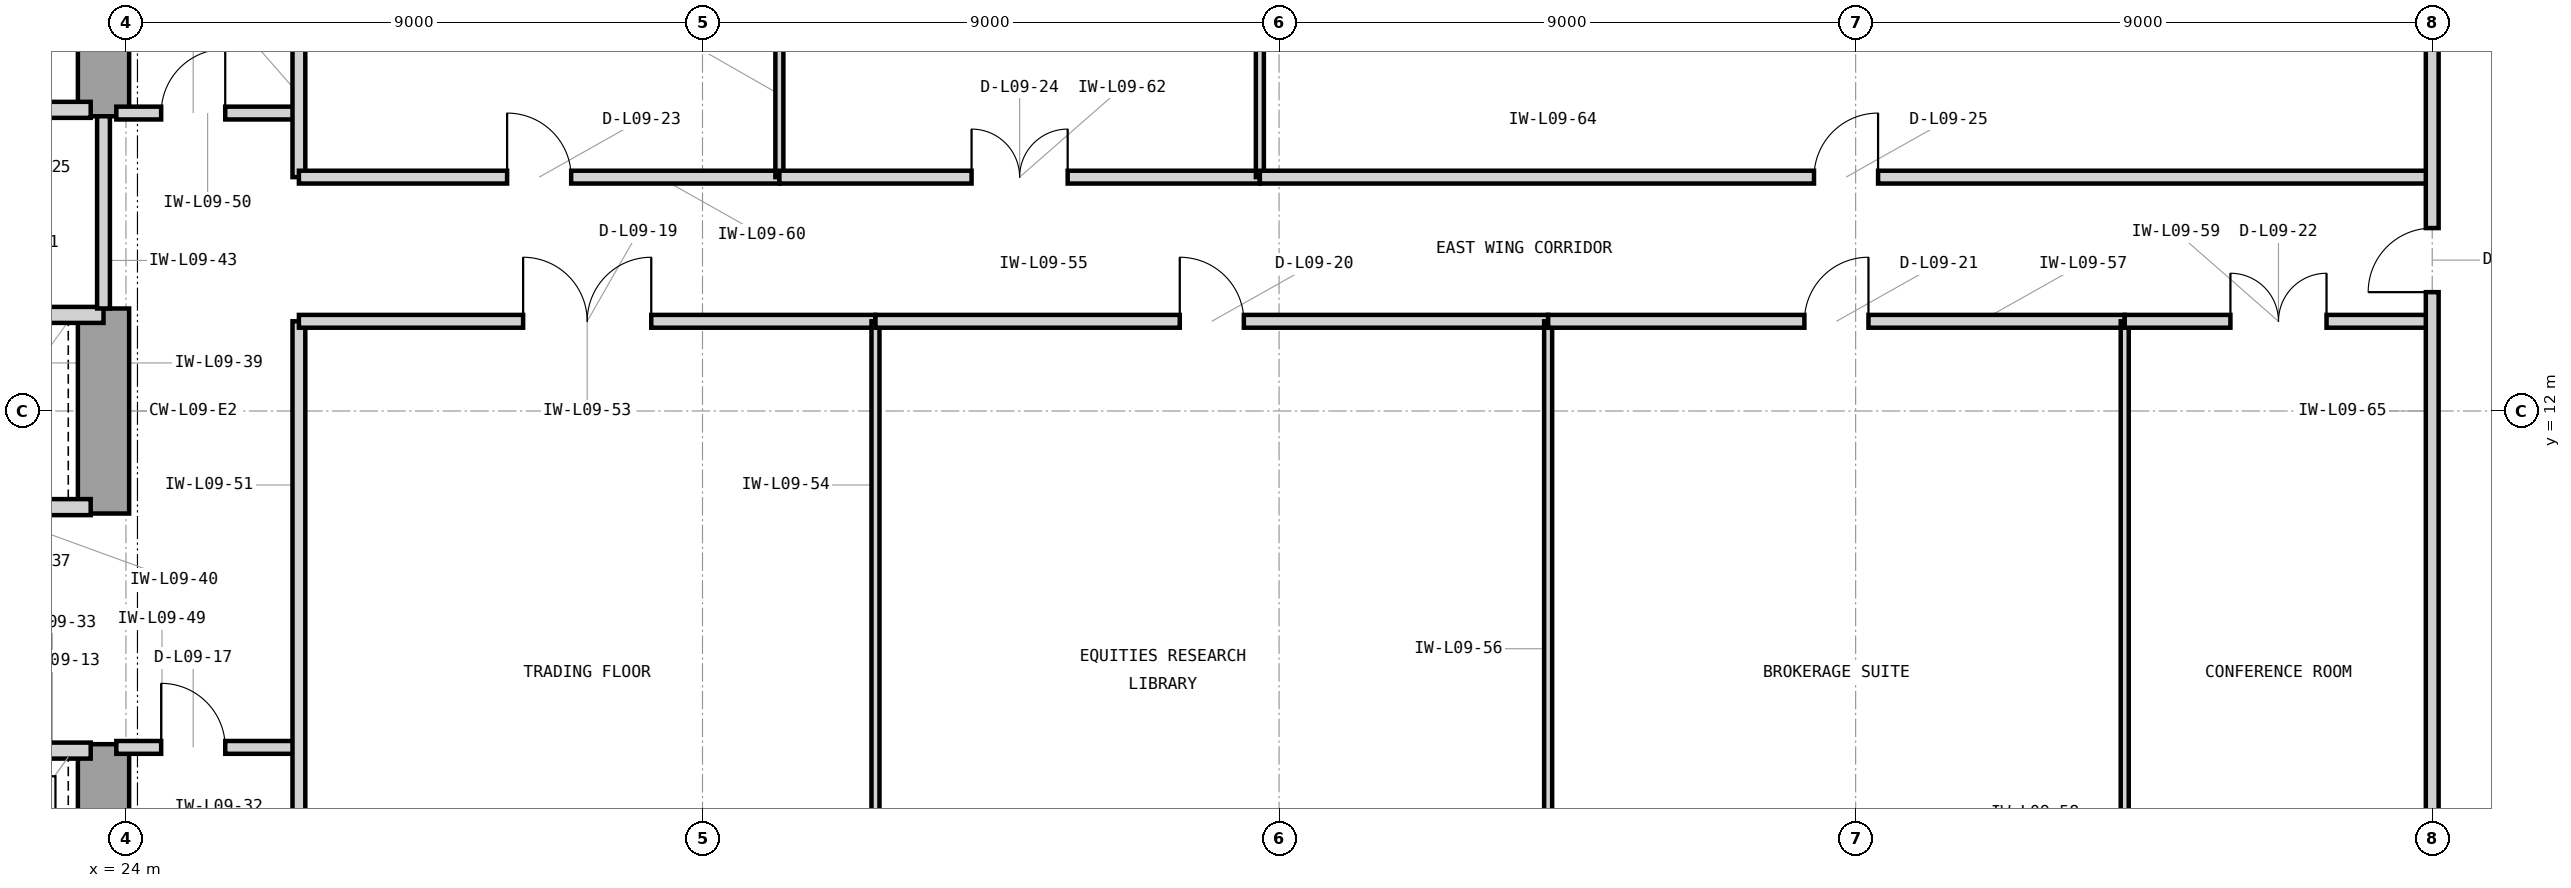
"""IFC4 building model, lengths in metres.
Left out: names, types, materials, properties, quantities, classifications, styles, units other than length and angle.
Written with IfcOpenShell. Run it as: python <this file> out.ifc"""

import sys

from ifc_helpers import new_model, si_unit, direction, frame, frame_2d, origin, place, context, subcontext, project, spatial, rectangle, extrude, element, fill, save


model = new_model("IFC4")
c1 = context("Model", 3, precision=1e-05, world=origin(), true_north=direction((0.0, 1.0)))
c2 = subcontext(c1, "Body", "Model", "MODEL_VIEW")
j1 = project(units=[si_unit("LENGTHUNIT", "METRE"), si_unit("PLANEANGLEUNIT", "RADIAN")], contexts=[c1])
p1 = place(None, origin())
s1 = spatial("IfcSite", under=j1, at=p1, CompositionType="ELEMENT")
p2 = place(p1, origin())
s2 = spatial("IfcBuilding", under=s1, at=p2, CompositionType="ELEMENT")
p3 = place(p2, frame((0.0, 0.0, 42.6)))
s3 = spatial("IfcBuildingStorey", under=s2, at=p3, CompositionType="ELEMENT", Elevation=42.6)
p4 = place(p3, frame((23.65, 3.75, 0.0), z_axis=(0.0, 0.0, 1.0), x_axis=(0.0, 1.0, 0.0)))
e1 = element("IfcWall", 1, at=p4, inside=s3, PredefinedType="SHEAR", context=c2, shape_type="SweptSolid", body=[
    extrude(rectangle(XDim=3.05, YDim=0.8, at=frame_2d((1.525, 0.0))), origin(), (0.0, 0.0, 1.0), 4.2),
])
p5 = place(p3, frame((23.65, 10.4, 0.0), z_axis=(0.0, 0.0, 1.0), x_axis=(0.0, 1.0, 0.0)))
e2 = element("IfcWall", 2, at=p5, inside=s3, PredefinedType="SHEAR", context=c2, shape_type="SweptSolid", body=[
    extrude(rectangle(XDim=3.2, YDim=0.8, at=frame_2d((1.6, 0.0))), origin(), (0.0, 0.0, 1.0), 4.2),
])
p6 = place(p3, frame((23.65, 16.6, 0.0), z_axis=(0.0, 0.0, 1.0), x_axis=(0.0, 1.0, 0.0)))
e3 = element("IfcWall", 3, at=p6, inside=s3, PredefinedType="SHEAR", context=c2, shape_type="SweptSolid", body=[
    extrude(rectangle(XDim=4.05, YDim=0.8, at=frame_2d((2.025, 0.0))), origin(), (0.0, 0.0, 1.0), 4.2),
])
p7 = place(p3, frame((21.05, 16.7, 0.0), z_axis=(0.0, 0.0, 1.0), x_axis=(1.0, 0.0, 0.0)))
e4 = element("IfcWall", 4, at=p7, inside=s3, PredefinedType="PARTITIONING", context=c2, shape_type="SweptSolid", body=[
    extrude(rectangle(XDim=2.4, YDim=0.25, at=frame_2d((1.2, 0.0))), origin(), (0.0, 0.0, 1.0), 3.426),
])
p8 = place(p3, frame((21.05, 6.7, 0.0), z_axis=(0.0, 0.0, 1.0), x_axis=(1.0, 0.0, 0.0)))
e5 = element("IfcWall", 5, at=p8, inside=s3, PredefinedType="PARTITIONING", context=c2, shape_type="SweptSolid", body=[
    extrude(rectangle(XDim=2.4, YDim=0.25, at=frame_2d((1.2, 0.0))), origin(), (0.0, 0.0, 1.0), 3.426),
])
p9 = place(p8, frame((0.48, 0.0, 0.0)))
e6 = element("IfcOpeningElement", 6, at=p9, cuts=e5, PredefinedType="OPENING", context=c2, shape_type="SweptSolid", body=[
    extrude(rectangle(XDim=1.15, YDim=2.25, at=frame_2d((0.575, 1.125))), frame((0.0, 0.135, 0.0), z_axis=(0.0, -1.0, 0.0), x_axis=(1.0, 0.0, 0.0)), (0.0, 0.0, 1.0), 0.27),
])
p10 = place(p3, frame((21.05, 10.5, 0.0), z_axis=(0.0, 0.0, 1.0), x_axis=(1.0, 0.0, 0.0)))
e7 = element("IfcWall", 7, at=p10, inside=s3, PredefinedType="PARTITIONING", context=c2, shape_type="SweptSolid", body=[
    extrude(rectangle(XDim=2.4, YDim=0.25, at=frame_2d((1.2, 0.0))), origin(), (0.0, 0.0, 1.0), 3.426),
])
p11 = place(p3, frame((14.7, 13.5, 0.0), z_axis=(0.0, 0.0, 1.0), x_axis=(1.0, 0.0, 0.0)))
e8 = element("IfcWall", 8, at=p11, inside=s3, PredefinedType="PARTITIONING", context=c2, shape_type="SweptSolid", body=[
    extrude(rectangle(XDim=8.95, YDim=0.25, at=frame_2d((4.475, 0.0))), origin(), (0.0, 0.0, 1.0), 3.426),
])
p12 = place(p3, frame((23.65, 13.6, 0.0), z_axis=(0.0, 0.0, 1.0), x_axis=(0.0, 1.0, 0.0)))
e9 = element("IfcWall", 9, at=p12, inside=s3, PredefinedType="PARTITIONING", context=c2, shape_type="SweptSolid", body=[
    extrude(rectangle(XDim=3.0, YDim=0.2, at=frame_2d((1.5, 0.0))), origin(), (0.0, 0.0, 1.0), 3.97),
])
p13 = place(p3, frame((23.85, 6.75, 0.0), z_axis=(0.0, 0.0, 1.0), x_axis=(1.0, 0.0, 0.0)))
e10 = element("IfcWall", 10, at=p13, inside=s3, PredefinedType="PARTITIONING", context=c2, shape_type="SweptSolid", body=[
    extrude(rectangle(XDim=2.85, YDim=0.2, at=frame_2d((1.425, 0.0))), origin(), (0.0, 0.0, 1.0), 3.97),
])
p14 = place(p13, frame((0.7, 0.0, 0.0)))
e11 = element("IfcOpeningElement", 11, at=p14, cuts=e10, PredefinedType="OPENING", context=c2, shape_type="SweptSolid", body=[
    extrude(rectangle(XDim=1.0, YDim=2.15, at=frame_2d((0.5, 1.075))), frame((0.0, 0.11, 0.0), z_axis=(0.0, -1.0, 0.0), x_axis=(1.0, 0.0, 0.0)), (0.0, 0.0, 1.0), 0.22),
])
p15 = place(p3, frame((23.85, 16.65, 0.0), z_axis=(0.0, 0.0, 1.0), x_axis=(1.0, 0.0, 0.0)))
e12 = element("IfcWall", 12, at=p15, inside=s3, PredefinedType="PARTITIONING", context=c2, shape_type="SweptSolid", body=[
    extrude(rectangle(XDim=2.85, YDim=0.2, at=frame_2d((1.425, 0.0))), origin(), (0.0, 0.0, 1.0), 3.97),
])
p16 = place(p15, frame((0.7, 0.0, 0.0)))
e13 = element("IfcOpeningElement", 13, at=p16, cuts=e12, PredefinedType="OPENING", context=c2, shape_type="SweptSolid", body=[
    extrude(rectangle(XDim=1.0, YDim=2.15, at=frame_2d((0.5, 1.075))), frame((0.0, 0.11, 0.0), z_axis=(0.0, -1.0, 0.0), x_axis=(1.0, 0.0, 0.0)), (0.0, 0.0, 1.0), 0.22),
])
p17 = place(p3, frame((26.7, 3.18, 0.0), z_axis=(0.0, 0.0, 1.0), x_axis=(0.0, 1.0, 0.0)))
e14 = element("IfcWall", 14, at=p17, inside=s3, PredefinedType="PARTITIONING", context=c2, shape_type="SweptSolid", body=[
    extrude(rectangle(XDim=10.22, YDim=0.2, at=frame_2d((5.11, 0.0))), origin(), (0.0, 0.0, 1.0), 3.97),
])
p18 = place(p3, frame((26.7, 15.65, 0.0), z_axis=(0.0, 0.0, 1.0), x_axis=(0.0, 1.0, 0.0)))
e15 = element("IfcWall", 15, at=p18, inside=s3, PredefinedType="PARTITIONING", context=c2, shape_type="SweptSolid", body=[
    extrude(rectangle(XDim=5.17, YDim=0.2, at=frame_2d((2.585, 0.0))), origin(), (0.0, 0.0, 1.0), 3.97),
])
p19 = place(p3, frame((26.7, 13.4, 0.0), z_axis=(0.0, 0.0, 1.0), x_axis=(1.0, 0.0, 0.0)))
e16 = element("IfcWall", 16, at=p19, inside=s3, PredefinedType="PARTITIONING", context=c2, shape_type="SweptSolid", body=[
    extrude(rectangle(XDim=9.0, YDim=0.2, at=frame_2d((4.5, 0.0))), origin(), (0.0, 0.0, 1.0), 3.97),
])
p20 = place(p19, frame((3.5, 0.0, 0.0)))
e17 = element("IfcOpeningElement", 17, at=p20, cuts=e16, PredefinedType="OPENING", context=c2, shape_type="SweptSolid", body=[
    extrude(rectangle(XDim=2.0, YDim=2.5, at=frame_2d((1.0, 1.25))), frame((0.0, 0.11, 0.0), z_axis=(0.0, -1.0, 0.0), x_axis=(1.0, 0.0, 0.0)), (0.0, 0.0, 1.0), 0.22),
])
p21 = place(p3, frame((35.7, 3.18, 0.0), z_axis=(0.0, 0.0, 1.0), x_axis=(0.0, 1.0, 0.0)))
e18 = element("IfcWall", 18, at=p21, inside=s3, PredefinedType="PARTITIONING", context=c2, shape_type="SweptSolid", body=[
    extrude(rectangle(XDim=10.22, YDim=0.125, at=frame_2d((5.11, 0.0))), origin(), (0.0, 0.0, 1.0), 3.97),
])
p22 = place(p3, frame((35.7, 13.4, 0.0), z_axis=(0.0, 0.0, 1.0), x_axis=(1.0, 0.0, 0.0)))
e19 = element("IfcWall", 19, at=p22, inside=s3, PredefinedType="PARTITIONING", context=c2, shape_type="SweptSolid", body=[
    extrude(rectangle(XDim=10.5, YDim=0.2, at=frame_2d((5.25, 0.0))), origin(), (0.0, 0.0, 1.0), 3.97),
])
p23 = place(p22, frame((4.75, 0.0, 0.0)))
e20 = element("IfcOpeningElement", 20, at=p23, cuts=e19, PredefinedType="OPENING", context=c2, shape_type="SweptSolid", body=[
    extrude(rectangle(XDim=1.0, YDim=2.15, at=frame_2d((0.5, 1.075))), frame((0.0, 0.11, 0.0), z_axis=(0.0, -1.0, 0.0), x_axis=(1.0, 0.0, 0.0)), (0.0, 0.0, 1.0), 0.22),
])
p24 = place(p3, frame((46.2, 3.18, 0.0), z_axis=(0.0, 0.0, 1.0), x_axis=(0.0, 1.0, 0.0)))
e21 = element("IfcWall", 21, at=p24, inside=s3, PredefinedType="PARTITIONING", context=c2, shape_type="SweptSolid", body=[
    extrude(rectangle(XDim=10.22, YDim=0.125, at=frame_2d((5.11, 0.0))), origin(), (0.0, 0.0, 1.0), 3.97),
])
p25 = place(p3, frame((46.2, 13.4, 0.0), z_axis=(0.0, 0.0, 1.0), x_axis=(1.0, 0.0, 0.0)))
e22 = element("IfcWall", 22, at=p25, inside=s3, PredefinedType="PARTITIONING", context=c2, shape_type="SweptSolid", body=[
    extrude(rectangle(XDim=9.0, YDim=0.2, at=frame_2d((4.5, 0.0))), origin(), (0.0, 0.0, 1.0), 3.97),
])
p26 = place(p25, frame((4.0, 0.0, 0.0)))
e23 = element("IfcOpeningElement", 23, at=p26, cuts=e22, PredefinedType="OPENING", context=c2, shape_type="SweptSolid", body=[
    extrude(rectangle(XDim=1.0, YDim=2.15, at=frame_2d((0.5, 1.075))), frame((0.0, 0.11, 0.0), z_axis=(0.0, -1.0, 0.0), x_axis=(1.0, 0.0, 0.0)), (0.0, 0.0, 1.0), 0.22),
])
p27 = place(p3, frame((55.2, 3.18, 0.0), z_axis=(0.0, 0.0, 1.0), x_axis=(0.0, 1.0, 0.0)))
e24 = element("IfcWall", 24, at=p27, inside=s3, PredefinedType="PARTITIONING", context=c2, shape_type="SweptSolid", body=[
    extrude(rectangle(XDim=10.22, YDim=0.125, at=frame_2d((5.11, 0.0))), origin(), (0.0, 0.0, 1.0), 3.97),
])
p28 = place(p3, frame((55.2, 13.4, 0.0), z_axis=(0.0, 0.0, 1.0), x_axis=(1.0, 0.0, 0.0)))
e25 = element("IfcWall", 25, at=p28, inside=s3, PredefinedType="PARTITIONING", context=c2, shape_type="SweptSolid", body=[
    extrude(rectangle(XDim=4.8, YDim=0.2, at=frame_2d((2.4, 0.0))), origin(), (0.0, 0.0, 1.0), 3.97),
])
p29 = place(p28, frame((1.65, 0.0, 0.0)))
e26 = element("IfcOpeningElement", 26, at=p29, cuts=e25, PredefinedType="OPENING", context=c2, shape_type="SweptSolid", body=[
    extrude(rectangle(XDim=1.5, YDim=2.3, at=frame_2d((0.75, 1.15))), frame((0.0, 0.11, 0.0), z_axis=(0.0, -1.0, 0.0), x_axis=(1.0, 0.0, 0.0)), (0.0, 0.0, 1.0), 0.22),
])
p30 = place(p3, frame((26.7, 15.65, 0.0), z_axis=(0.0, 0.0, 1.0), x_axis=(1.0, 0.0, 0.0)))
e27 = element("IfcWall", 27, at=p30, inside=s3, PredefinedType="PARTITIONING", context=c2, shape_type="SweptSolid", body=[
    extrude(rectangle(XDim=7.5, YDim=0.2, at=frame_2d((3.75, 0.0))), origin(), (0.0, 0.0, 1.0), 3.97),
])
p31 = place(p30, frame((3.25, 0.0, 0.0)))
e28 = element("IfcOpeningElement", 28, at=p31, cuts=e27, PredefinedType="OPENING", context=c2, shape_type="SweptSolid", body=[
    extrude(rectangle(XDim=1.0, YDim=2.15, at=frame_2d((0.5, 1.075))), frame((0.0, 0.11, 0.0), z_axis=(0.0, -1.0, 0.0), x_axis=(1.0, 0.0, 0.0)), (0.0, 0.0, 1.0), 0.22),
])
p32 = place(p3, frame((34.2, 15.65, 0.0), z_axis=(0.0, 0.0, 1.0), x_axis=(0.0, 1.0, 0.0)))
e29 = element("IfcWall", 29, at=p32, inside=s3, PredefinedType="PARTITIONING", context=c2, shape_type="SweptSolid", body=[
    extrude(rectangle(XDim=5.17, YDim=0.125, at=frame_2d((2.585, 0.0))), origin(), (0.0, 0.0, 1.0), 3.97),
])
p33 = place(p3, frame((34.2, 15.65, 0.0), z_axis=(0.0, 0.0, 1.0), x_axis=(1.0, 0.0, 0.0)))
e30 = element("IfcWall", 30, at=p33, inside=s3, PredefinedType="PARTITIONING", context=c2, shape_type="SweptSolid", body=[
    extrude(rectangle(XDim=7.5, YDim=0.2, at=frame_2d((3.75, 0.0))), origin(), (0.0, 0.0, 1.0), 3.97),
])
p34 = place(p33, frame((3.0, 0.0, 0.0)))
e31 = element("IfcOpeningElement", 31, at=p34, cuts=e30, PredefinedType="OPENING", context=c2, shape_type="SweptSolid", body=[
    extrude(rectangle(XDim=1.5, YDim=2.3, at=frame_2d((0.75, 1.15))), frame((0.0, 0.11, 0.0), z_axis=(0.0, -1.0, 0.0), x_axis=(1.0, 0.0, 0.0)), (0.0, 0.0, 1.0), 0.22),
])
p35 = place(p3, frame((41.7, 15.65, 0.0), z_axis=(0.0, 0.0, 1.0), x_axis=(0.0, 1.0, 0.0)))
e32 = element("IfcWall", 32, at=p35, inside=s3, PredefinedType="PARTITIONING", context=c2, shape_type="SweptSolid", body=[
    extrude(rectangle(XDim=5.17, YDim=0.125, at=frame_2d((2.585, 0.0))), origin(), (0.0, 0.0, 1.0), 3.97),
])
p36 = place(p3, frame((41.7, 15.65, 0.0), z_axis=(0.0, 0.0, 1.0), x_axis=(1.0, 0.0, 0.0)))
e33 = element("IfcWall", 33, at=p36, inside=s3, PredefinedType="PARTITIONING", context=c2, shape_type="SweptSolid", body=[
    extrude(rectangle(XDim=18.3, YDim=0.2, at=frame_2d((9.15, 0.0))), origin(), (0.0, 0.0, 1.0), 3.97),
])
p37 = place(p36, frame((8.65, 0.0, 0.0)))
e34 = element("IfcOpeningElement", 34, at=p37, cuts=e33, PredefinedType="OPENING", context=c2, shape_type="SweptSolid", body=[
    extrude(rectangle(XDim=1.0, YDim=2.15, at=frame_2d((0.5, 1.075))), frame((0.0, 0.11, 0.0), z_axis=(0.0, -1.0, 0.0), x_axis=(1.0, 0.0, 0.0)), (0.0, 0.0, 1.0), 0.22),
])
p38 = place(p3, frame((60.0, 3.18, 0.0), z_axis=(0.0, 0.0, 1.0), x_axis=(0.0, 1.0, 0.0)))
e35 = element("IfcWall", 35, at=p38, inside=s3, PredefinedType="PARTITIONING", context=c2, shape_type="SweptSolid", body=[
    extrude(rectangle(XDim=17.64, YDim=0.2, at=frame_2d((8.82, 0.0))), origin(), (0.0, 0.0, 1.0), 3.97),
])
p39 = place(p38, frame((10.675, 0.0, 0.0)))
e36 = element("IfcOpeningElement", 36, at=p39, cuts=e35, PredefinedType="OPENING", context=c2, shape_type="SweptSolid", body=[
    extrude(rectangle(XDim=1.0, YDim=2.15, at=frame_2d((0.5, 1.075))), frame((0.0, 0.11, 0.0), z_axis=(0.0, -1.0, 0.0), x_axis=(1.0, 0.0, 0.0)), (0.0, 0.0, 1.0), 0.22),
])
p40 = place(p14, origin())
e37 = element("IfcDoor", 37, at=p40, inside=s3, OperationType="SINGLE_SWING_LEFT", PredefinedType="DOOR", context=c2, shape_type="SweptSolid", body=[
    extrude(rectangle(XDim=1.0, YDim=2.15, at=frame_2d((0.5, 1.075))), frame((0.0, 0.025, 0.0), z_axis=(0.0, -1.0, 0.0), x_axis=(1.0, 0.0, 0.0)), (0.0, 0.0, 1.0), 0.05),
])
fill(e11, e37)
p41 = place(p16, origin())
e38 = element("IfcDoor", 38, at=p41, inside=s3, OperationType="SINGLE_SWING_RIGHT", PredefinedType="DOOR", context=c2, shape_type="SweptSolid", body=[
    extrude(rectangle(XDim=1.0, YDim=2.15, at=frame_2d((0.5, 1.075))), frame((0.0, 0.025, 0.0), z_axis=(0.0, -1.0, 0.0), x_axis=(1.0, 0.0, 0.0)), (0.0, 0.0, 1.0), 0.05),
])
fill(e13, e38)
p42 = place(p20, origin())
e39 = element("IfcDoor", 39, at=p42, inside=s3, OperationType="DOUBLE_DOOR_SINGLE_SWING", PredefinedType="DOOR", context=c2, shape_type="SweptSolid", body=[
    extrude(rectangle(XDim=2.0, YDim=2.5, at=frame_2d((1.0, 1.25))), frame((0.0, 0.025, 0.0), z_axis=(0.0, -1.0, 0.0), x_axis=(1.0, 0.0, 0.0)), (0.0, 0.0, 1.0), 0.05),
])
fill(e17, e39)
p43 = place(p23, origin())
e40 = element("IfcDoor", 40, at=p43, inside=s3, OperationType="SINGLE_SWING_LEFT", PredefinedType="DOOR", context=c2, shape_type="SweptSolid", body=[
    extrude(rectangle(XDim=1.0, YDim=2.15, at=frame_2d((0.5, 1.075))), frame((0.0, 0.025, 0.0), z_axis=(0.0, -1.0, 0.0), x_axis=(1.0, 0.0, 0.0)), (0.0, 0.0, 1.0), 0.05),
])
fill(e20, e40)
p44 = place(p26, origin())
e41 = element("IfcDoor", 41, at=p44, inside=s3, OperationType="SINGLE_SWING_RIGHT", PredefinedType="DOOR", context=c2, shape_type="SweptSolid", body=[
    extrude(rectangle(XDim=1.0, YDim=2.15, at=frame_2d((0.5, 1.075))), frame((0.0, 0.025, 0.0), z_axis=(0.0, -1.0, 0.0), x_axis=(1.0, 0.0, 0.0)), (0.0, 0.0, 1.0), 0.05),
])
fill(e23, e41)
p45 = place(p29, origin())
e42 = element("IfcDoor", 42, at=p45, inside=s3, OperationType="DOUBLE_DOOR_SINGLE_SWING", PredefinedType="DOOR", context=c2, shape_type="SweptSolid", body=[
    extrude(rectangle(XDim=1.5, YDim=2.3, at=frame_2d((0.75, 1.15))), frame((0.0, 0.025, 0.0), z_axis=(0.0, -1.0, 0.0), x_axis=(1.0, 0.0, 0.0)), (0.0, 0.0, 1.0), 0.05),
])
fill(e26, e42)
p46 = place(p31, origin())
e43 = element("IfcDoor", 43, at=p46, inside=s3, OperationType="SINGLE_SWING_LEFT", PredefinedType="DOOR", context=c2, shape_type="SweptSolid", body=[
    extrude(rectangle(XDim=1.0, YDim=2.15, at=frame_2d((0.5, 1.075))), frame((0.0, 0.025, 0.0), z_axis=(0.0, -1.0, 0.0), x_axis=(1.0, 0.0, 0.0)), (0.0, 0.0, 1.0), 0.05),
])
fill(e28, e43)
p47 = place(p34, origin())
e44 = element("IfcDoor", 44, at=p47, inside=s3, OperationType="DOUBLE_DOOR_SINGLE_SWING", PredefinedType="DOOR", context=c2, shape_type="SweptSolid", body=[
    extrude(rectangle(XDim=1.5, YDim=2.3, at=frame_2d((0.75, 1.15))), frame((0.0, 0.025, 0.0), z_axis=(0.0, -1.0, 0.0), x_axis=(1.0, 0.0, 0.0)), (0.0, 0.0, 1.0), 0.05),
])
fill(e31, e44)
p48 = place(p37, origin())
e45 = element("IfcDoor", 45, at=p48, inside=s3, OperationType="SINGLE_SWING_RIGHT", PredefinedType="DOOR", context=c2, shape_type="SweptSolid", body=[
    extrude(rectangle(XDim=1.0, YDim=2.15, at=frame_2d((0.5, 1.075))), frame((0.0, 0.025, 0.0), z_axis=(0.0, -1.0, 0.0), x_axis=(1.0, 0.0, 0.0)), (0.0, 0.0, 1.0), 0.05),
])
fill(e34, e45)
p49 = place(p39, origin())
e46 = element("IfcDoor", 46, at=p49, inside=s3, OperationType="SINGLE_SWING_LEFT", PredefinedType="DOOR", context=c2, shape_type="SweptSolid", body=[
    extrude(rectangle(XDim=1.0, YDim=2.15, at=frame_2d((0.5, 1.075))), frame((0.0, 0.025, 0.0), z_axis=(0.0, -1.0, 0.0), x_axis=(1.0, 0.0, 0.0)), (0.0, 0.0, 1.0), 0.05),
])
fill(e36, e46)
save(model, sys.argv[1])
